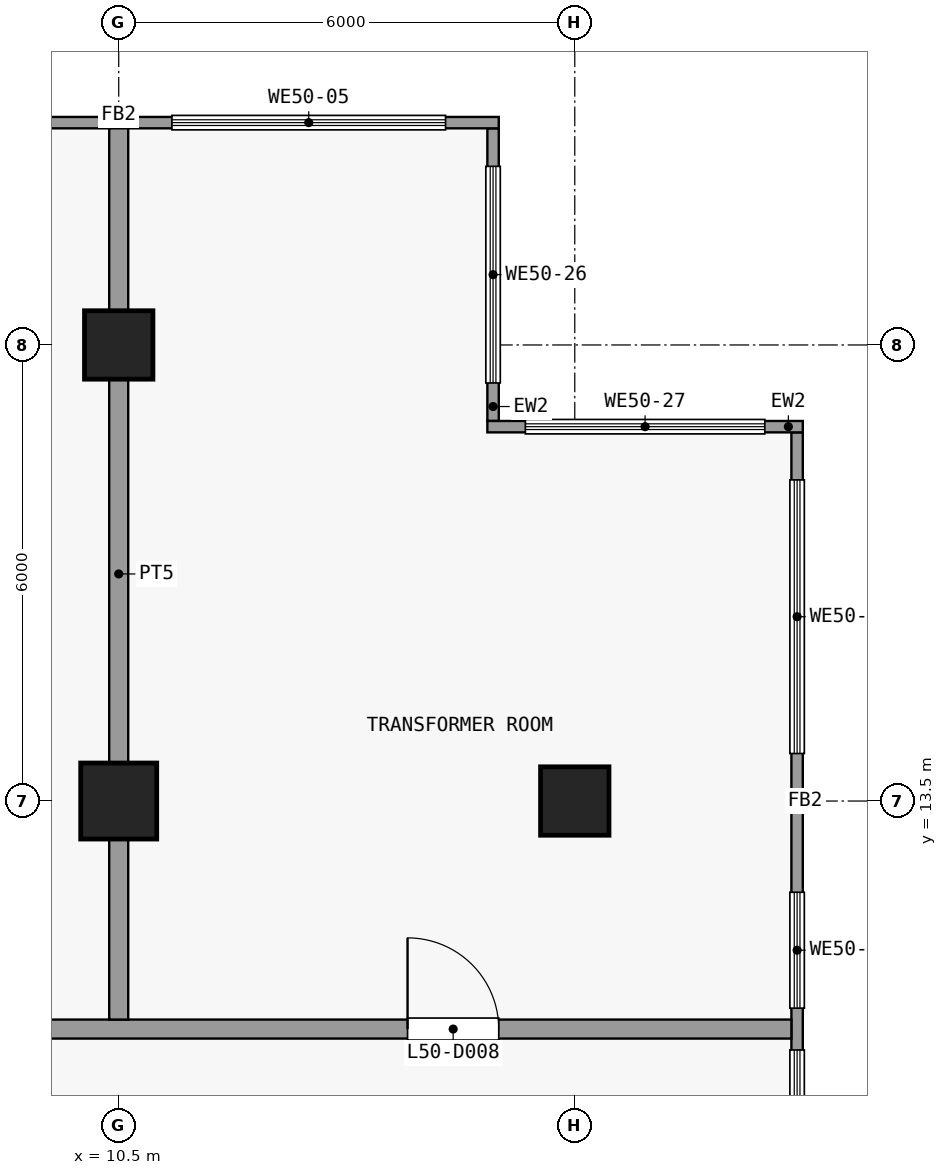
"""IFC4 building model, lengths in metres.
Left out: names, types, materials, properties, quantities, classifications, styles, units other than length and angle.
Written with IfcOpenShell. Run it as: python <this file> out.ifc"""

import sys

from ifc_helpers import new_model, si_unit, direction, frame, frame_2d, origin, origin_2d, place, context, subcontext, project, spatial, rectangle, extrude, element, fill, save


model = new_model("IFC4")
c1 = context("Model", 3, precision=1e-05, world=origin(), true_north=direction((0.0, 1.0)))
c2 = subcontext(c1, "Body", "Model", "MODEL_VIEW")
j1 = project(units=[si_unit("LENGTHUNIT", "METRE"), si_unit("PLANEANGLEUNIT", "RADIAN")], contexts=[c1])
p1 = place(None, origin())
s1 = spatial("IfcSite", under=j1, at=p1, CompositionType="ELEMENT")
p2 = place(p1, origin())
s2 = spatial("IfcBuilding", under=s1, at=p2, CompositionType="ELEMENT")
p3 = place(p2, frame((0.0, 0.0, 199.7)))
s3 = spatial("IfcBuildingStorey", under=s2, at=p3, CompositionType="ELEMENT", Elevation=199.7)
p4 = place(p3, frame((10.5, 13.5, 0.0), z_axis=(0.0, 0.0, 1.0), x_axis=(1.0, 0.0, 0.0)))
e1 = element("IfcColumn", 1, at=p4, inside=s3, PredefinedType="COLUMN", context=c2, shape_type="SweptSolid", body=[
    extrude(rectangle(XDim=1.0, YDim=1.0, at=origin_2d()), origin(), (0.0, 0.0, 1.0), 5.4),
])
for number, where, z_axis, x_axis in (
    (2, (10.5, 19.5, 0.0), (0.0, 0.0, 1.0), (1.0, 0.0, 0.0)),
    (3, (16.5, 13.5, 0.0), (0.0, 0.0, 1.0), (1.0, 0.0, 0.0)),
):
    element("IfcColumn", number, at=place(p3, frame(where, z_axis=z_axis, x_axis=x_axis)), inside=s3, PredefinedType="COLUMN", context=c2, shape_type="SweptSolid", body=[
        extrude(rectangle(XDim=0.9, YDim=0.9, at=origin_2d()), origin(), (0.0, 0.0, 1.0), 5.4),
    ])
p5 = place(p3, frame((-15.5, 22.425, 0.0), z_axis=(0.0, 0.0, 1.0), x_axis=(1.0, 0.0, 0.0)))
e4 = element("IfcWall", 4, at=p5, inside=s3, PredefinedType="SOLIDWALL", context=c2, shape_type="SweptSolid", body=[
    extrude(rectangle(XDim=31.0, YDim=0.15, at=frame_2d((15.5, 0.0))), origin(), (0.0, 0.0, 1.0), 5.0),
])
p6 = place(p5, frame((0.7, 0.0, 1.2)))
e5 = element("IfcOpeningElement", 5, at=p6, cuts=e4, PredefinedType="OPENING", context=c2, shape_type="SweptSolid", body=[
    extrude(rectangle(XDim=3.6, YDim=3.0, at=frame_2d((1.8, 1.5))), frame((0.0, 0.085, 0.0), z_axis=(0.0, -1.0, 0.0), x_axis=(1.0, 0.0, 0.0)), (0.0, 0.0, 1.0), 0.17),
])
p7 = place(p5, frame((6.2, 0.0, 1.2)))
e6 = element("IfcOpeningElement", 6, at=p7, cuts=e4, PredefinedType="OPENING", context=c2, shape_type="SweptSolid", body=[
    extrude(rectangle(XDim=3.6, YDim=3.0, at=frame_2d((1.8, 1.5))), frame((0.0, 0.085, 0.0), z_axis=(0.0, -1.0, 0.0), x_axis=(1.0, 0.0, 0.0)), (0.0, 0.0, 1.0), 0.17),
])
p8 = place(p5, frame((13.7, 0.0, 1.2)))
e7 = element("IfcOpeningElement", 7, at=p8, cuts=e4, PredefinedType="OPENING", context=c2, shape_type="SweptSolid", body=[
    extrude(rectangle(XDim=3.6, YDim=3.0, at=frame_2d((1.8, 1.5))), frame((0.0, 0.085, 0.0), z_axis=(0.0, -1.0, 0.0), x_axis=(1.0, 0.0, 0.0)), (0.0, 0.0, 1.0), 0.17),
])
p9 = place(p5, frame((21.2, 0.0, 1.2)))
e8 = element("IfcOpeningElement", 8, at=p9, cuts=e4, PredefinedType="OPENING", context=c2, shape_type="SweptSolid", body=[
    extrude(rectangle(XDim=3.6, YDim=3.0, at=frame_2d((1.8, 1.5))), frame((0.0, 0.085, 0.0), z_axis=(0.0, -1.0, 0.0), x_axis=(1.0, 0.0, 0.0)), (0.0, 0.0, 1.0), 0.17),
])
p10 = place(p5, frame((26.7, 0.0, 1.2)))
e9 = element("IfcOpeningElement", 9, at=p10, cuts=e4, PredefinedType="OPENING", context=c2, shape_type="SweptSolid", body=[
    extrude(rectangle(XDim=3.6, YDim=3.0, at=frame_2d((1.8, 1.5))), frame((0.0, 0.085, 0.0), z_axis=(0.0, -1.0, 0.0), x_axis=(1.0, 0.0, 0.0)), (0.0, 0.0, 1.0), 0.17),
])
p11 = place(p3, frame((19.425, 18.35, 0.0), z_axis=(0.0, 0.0, 1.0), x_axis=(0.0, -1.0, 0.0)))
e10 = element("IfcWall", 10, at=p11, inside=s3, PredefinedType="SOLIDWALL", context=c2, shape_type="SweptSolid", body=[
    extrude(rectangle(XDim=39.7, YDim=0.15, at=frame_2d((19.85, 0.0))), origin(), (0.0, 0.0, 1.0), 5.0),
])
p12 = place(p11, frame((33.975, 0.0, 1.2)))
e11 = element("IfcOpeningElement", 11, at=p12, cuts=e10, PredefinedType="OPENING", context=c2, shape_type="SweptSolid", body=[
    extrude(rectangle(XDim=3.6, YDim=3.0, at=frame_2d((1.8, 1.5))), frame((0.0, 0.085, 0.0), z_axis=(0.0, -1.0, 0.0), x_axis=(1.0, 0.0, 0.0)), (0.0, 0.0, 1.0), 0.17),
])
p13 = place(p11, frame((26.525, 0.0, 1.2)))
e12 = element("IfcOpeningElement", 12, at=p13, cuts=e10, PredefinedType="OPENING", context=c2, shape_type="SweptSolid", body=[
    extrude(rectangle(XDim=2.625, YDim=3.0, at=frame_2d((1.312, 1.5))), frame((0.0, 0.085, 0.0), z_axis=(0.0, -1.0, 0.0), x_axis=(1.0, 0.0, 0.0)), (0.0, 0.0, 1.0), 0.17),
])
p14 = place(p11, frame((18.05, 0.0, 1.2)))
e13 = element("IfcOpeningElement", 13, at=p14, cuts=e10, PredefinedType="OPENING", context=c2, shape_type="SweptSolid", body=[
    extrude(rectangle(XDim=3.6, YDim=3.0, at=frame_2d((1.8, 1.5))), frame((0.0, 0.085, 0.0), z_axis=(0.0, -1.0, 0.0), x_axis=(1.0, 0.0, 0.0)), (0.0, 0.0, 1.0), 0.17),
])
p15 = place(p11, frame((12.05, 0.0, 1.2)))
e14 = element("IfcOpeningElement", 14, at=p15, cuts=e10, PredefinedType="OPENING", context=c2, shape_type="SweptSolid", body=[
    extrude(rectangle(XDim=3.6, YDim=3.0, at=frame_2d((1.8, 1.5))), frame((0.0, 0.085, 0.0), z_axis=(0.0, -1.0, 0.0), x_axis=(1.0, 0.0, 0.0)), (0.0, 0.0, 1.0), 0.17),
])
p16 = place(p11, frame((8.125, 0.0, 1.2)))
e15 = element("IfcOpeningElement", 15, at=p16, cuts=e10, PredefinedType="OPENING", context=c2, shape_type="SweptSolid", body=[
    extrude(rectangle(XDim=1.525, YDim=3.0, at=frame_2d((0.762, 1.5))), frame((0.0, 0.085, 0.0), z_axis=(0.0, -1.0, 0.0), x_axis=(1.0, 0.0, 0.0)), (0.0, 0.0, 1.0), 0.17),
])
p17 = place(p11, frame((6.05, 0.0, 1.2)))
e16 = element("IfcOpeningElement", 16, at=p17, cuts=e10, PredefinedType="OPENING", context=c2, shape_type="SweptSolid", body=[
    extrude(rectangle(XDim=1.525, YDim=3.0, at=frame_2d((0.762, 1.5))), frame((0.0, 0.085, 0.0), z_axis=(0.0, -1.0, 0.0), x_axis=(1.0, 0.0, 0.0)), (0.0, 0.0, 1.0), 0.17),
])
p18 = place(p11, frame((0.625, 0.0, 1.2)))
e17 = element("IfcOpeningElement", 17, at=p18, cuts=e10, PredefinedType="OPENING", context=c2, shape_type="SweptSolid", body=[
    extrude(rectangle(XDim=3.6, YDim=3.0, at=frame_2d((1.8, 1.5))), frame((0.0, 0.085, 0.0), z_axis=(0.0, -1.0, 0.0), x_axis=(1.0, 0.0, 0.0)), (0.0, 0.0, 1.0), 0.17),
])
p19 = place(p3, frame((15.425, 22.35, 0.0), z_axis=(0.0, 0.0, 1.0), x_axis=(0.0, -1.0, 0.0)))
e18 = element("IfcWall", 18, at=p19, inside=s3, PredefinedType="SOLIDWALL", context=c2, shape_type="SweptSolid", body=[
    extrude(rectangle(XDim=3.85, YDim=0.15, at=frame_2d((1.925, 0.0))), origin(), (0.0, 0.0, 1.0), 5.0),
])
p20 = place(p19, frame((0.5, 0.0, 1.2)))
e19 = element("IfcOpeningElement", 19, at=p20, cuts=e18, PredefinedType="OPENING", context=c2, shape_type="SweptSolid", body=[
    extrude(rectangle(XDim=2.85, YDim=3.0, at=frame_2d((1.425, 1.5))), frame((0.0, 0.085, 0.0), z_axis=(0.0, -1.0, 0.0), x_axis=(1.0, 0.0, 0.0)), (0.0, 0.0, 1.0), 0.17),
])
p21 = place(p3, frame((15.35, 18.425, 0.0), z_axis=(0.0, 0.0, 1.0), x_axis=(1.0, 0.0, 0.0)))
e20 = element("IfcWall", 20, at=p21, inside=s3, PredefinedType="SOLIDWALL", context=c2, shape_type="SweptSolid", body=[
    extrude(rectangle(XDim=4.15, YDim=0.15, at=frame_2d((2.075, 0.0))), origin(), (0.0, 0.0, 1.0), 5.0),
])
p22 = place(p21, frame((0.5, 0.0, 1.2)))
e21 = element("IfcOpeningElement", 21, at=p22, cuts=e20, PredefinedType="OPENING", context=c2, shape_type="SweptSolid", body=[
    extrude(rectangle(XDim=3.15, YDim=3.0, at=frame_2d((1.575, 1.5))), frame((0.0, 0.085, 0.0), z_axis=(0.0, -1.0, 0.0), x_axis=(1.0, 0.0, 0.0)), (0.0, 0.0, 1.0), 0.17),
])
p23 = place(p3, frame((-19.35, 10.5, 0.0), z_axis=(0.0, 0.0, 1.0), x_axis=(1.0, 0.0, 0.0)))
e22 = element("IfcWall", 22, at=p23, inside=s3, PredefinedType="PARTITIONING", context=c2, shape_type="SweptSolid", body=[
    extrude(rectangle(XDim=38.7, YDim=0.25, at=frame_2d((19.35, 0.0))), origin(), (0.0, 0.0, 1.0), 5.0),
])
p24 = place(p23, frame((6.8, 0.0, 0.0)))
e23 = element("IfcOpeningElement", 23, at=p24, cuts=e22, PredefinedType="OPENING", context=c2, shape_type="SweptSolid", body=[
    extrude(rectangle(XDim=1.2, YDim=2.1, at=frame_2d((0.6, 1.05))), frame((0.0, 0.135, 0.0), z_axis=(0.0, -1.0, 0.0), x_axis=(1.0, 0.0, 0.0)), (0.0, 0.0, 1.0), 0.27),
])
p25 = place(p23, frame((21.75, 0.0, 0.0)))
e24 = element("IfcOpeningElement", 24, at=p25, cuts=e22, PredefinedType="OPENING", context=c2, shape_type="SweptSolid", body=[
    extrude(rectangle(XDim=1.2, YDim=2.1, at=frame_2d((0.6, 1.05))), frame((0.0, 0.135, 0.0), z_axis=(0.0, -1.0, 0.0), x_axis=(1.0, 0.0, 0.0)), (0.0, 0.0, 1.0), 0.27),
])
p26 = place(p23, frame((33.65, 0.0, 0.0)))
e25 = element("IfcOpeningElement", 25, at=p26, cuts=e22, PredefinedType="OPENING", context=c2, shape_type="SweptSolid", body=[
    extrude(rectangle(XDim=1.2, YDim=2.1, at=frame_2d((0.6, 1.05))), frame((0.0, 0.135, 0.0), z_axis=(0.0, -1.0, 0.0), x_axis=(1.0, 0.0, 0.0)), (0.0, 0.0, 1.0), 0.27),
])
p27 = place(p3, frame((10.5, 10.625, 0.0), z_axis=(0.0, 0.0, 1.0), x_axis=(0.0, 1.0, 0.0)))
e26 = element("IfcWall", 26, at=p27, inside=s3, PredefinedType="PARTITIONING", context=c2, shape_type="SweptSolid", body=[
    extrude(rectangle(XDim=11.725, YDim=0.25, at=frame_2d((5.863, 0.0))), origin(), (0.0, 0.0, 1.0), 5.0),
])
p28 = place(p10, origin())
e27 = element("IfcWindow", 27, at=p28, inside=s3, PartitioningType="SINGLE_PANEL", PredefinedType="WINDOW", context=c2, shape_type="SweptSolid", body=[
    extrude(rectangle(XDim=3.6, YDim=3.0, at=frame_2d((1.8, 1.5))), frame((0.0, 0.03, 0.0), z_axis=(0.0, -1.0, 0.0), x_axis=(1.0, 0.0, 0.0)), (0.0, 0.0, 1.0), 0.06),
])
fill(e9, e27)
p29 = place(p16, origin())
e28 = element("IfcWindow", 28, at=p29, inside=s3, PartitioningType="SINGLE_PANEL", PredefinedType="WINDOW", context=c2, shape_type="SweptSolid", body=[
    extrude(rectangle(XDim=1.525, YDim=3.0, at=frame_2d((0.762, 1.5))), frame((0.0, 0.03, 0.0), z_axis=(0.0, -1.0, 0.0), x_axis=(1.0, 0.0, 0.0)), (0.0, 0.0, 1.0), 0.06),
])
fill(e15, e28)
p30 = place(p17, origin())
e29 = element("IfcWindow", 29, at=p30, inside=s3, PartitioningType="SINGLE_PANEL", PredefinedType="WINDOW", context=c2, shape_type="SweptSolid", body=[
    extrude(rectangle(XDim=1.525, YDim=3.0, at=frame_2d((0.762, 1.5))), frame((0.0, 0.03, 0.0), z_axis=(0.0, -1.0, 0.0), x_axis=(1.0, 0.0, 0.0)), (0.0, 0.0, 1.0), 0.06),
])
fill(e16, e29)
p31 = place(p18, origin())
e30 = element("IfcWindow", 30, at=p31, inside=s3, PartitioningType="SINGLE_PANEL", PredefinedType="WINDOW", context=c2, shape_type="SweptSolid", body=[
    extrude(rectangle(XDim=3.6, YDim=3.0, at=frame_2d((1.8, 1.5))), frame((0.0, 0.03, 0.0), z_axis=(0.0, -1.0, 0.0), x_axis=(1.0, 0.0, 0.0)), (0.0, 0.0, 1.0), 0.06),
])
fill(e17, e30)
p32 = place(p20, origin())
e31 = element("IfcWindow", 31, at=p32, inside=s3, PartitioningType="SINGLE_PANEL", PredefinedType="WINDOW", context=c2, shape_type="SweptSolid", body=[
    extrude(rectangle(XDim=2.85, YDim=3.0, at=frame_2d((1.425, 1.5))), frame((0.0, 0.03, 0.0), z_axis=(0.0, -1.0, 0.0), x_axis=(1.0, 0.0, 0.0)), (0.0, 0.0, 1.0), 0.06),
])
fill(e19, e31)
p33 = place(p22, origin())
e32 = element("IfcWindow", 32, at=p33, inside=s3, PartitioningType="SINGLE_PANEL", PredefinedType="WINDOW", context=c2, shape_type="SweptSolid", body=[
    extrude(rectangle(XDim=3.15, YDim=3.0, at=frame_2d((1.575, 1.5))), frame((0.0, 0.03, 0.0), z_axis=(0.0, -1.0, 0.0), x_axis=(1.0, 0.0, 0.0)), (0.0, 0.0, 1.0), 0.06),
])
fill(e21, e32)
p34 = place(p26, origin())
e33 = element("IfcDoor", 33, at=p34, inside=s3, OperationType="SINGLE_SWING_RIGHT", PredefinedType="DOOR", context=c2, shape_type="SweptSolid", body=[
    extrude(rectangle(XDim=1.2, YDim=2.1, at=frame_2d((0.6, 1.05))), frame((0.0, 0.025, 0.0), z_axis=(0.0, -1.0, 0.0), x_axis=(1.0, 0.0, 0.0)), (0.0, 0.0, 1.0), 0.05),
])
fill(e25, e33)
save(model, sys.argv[1])
